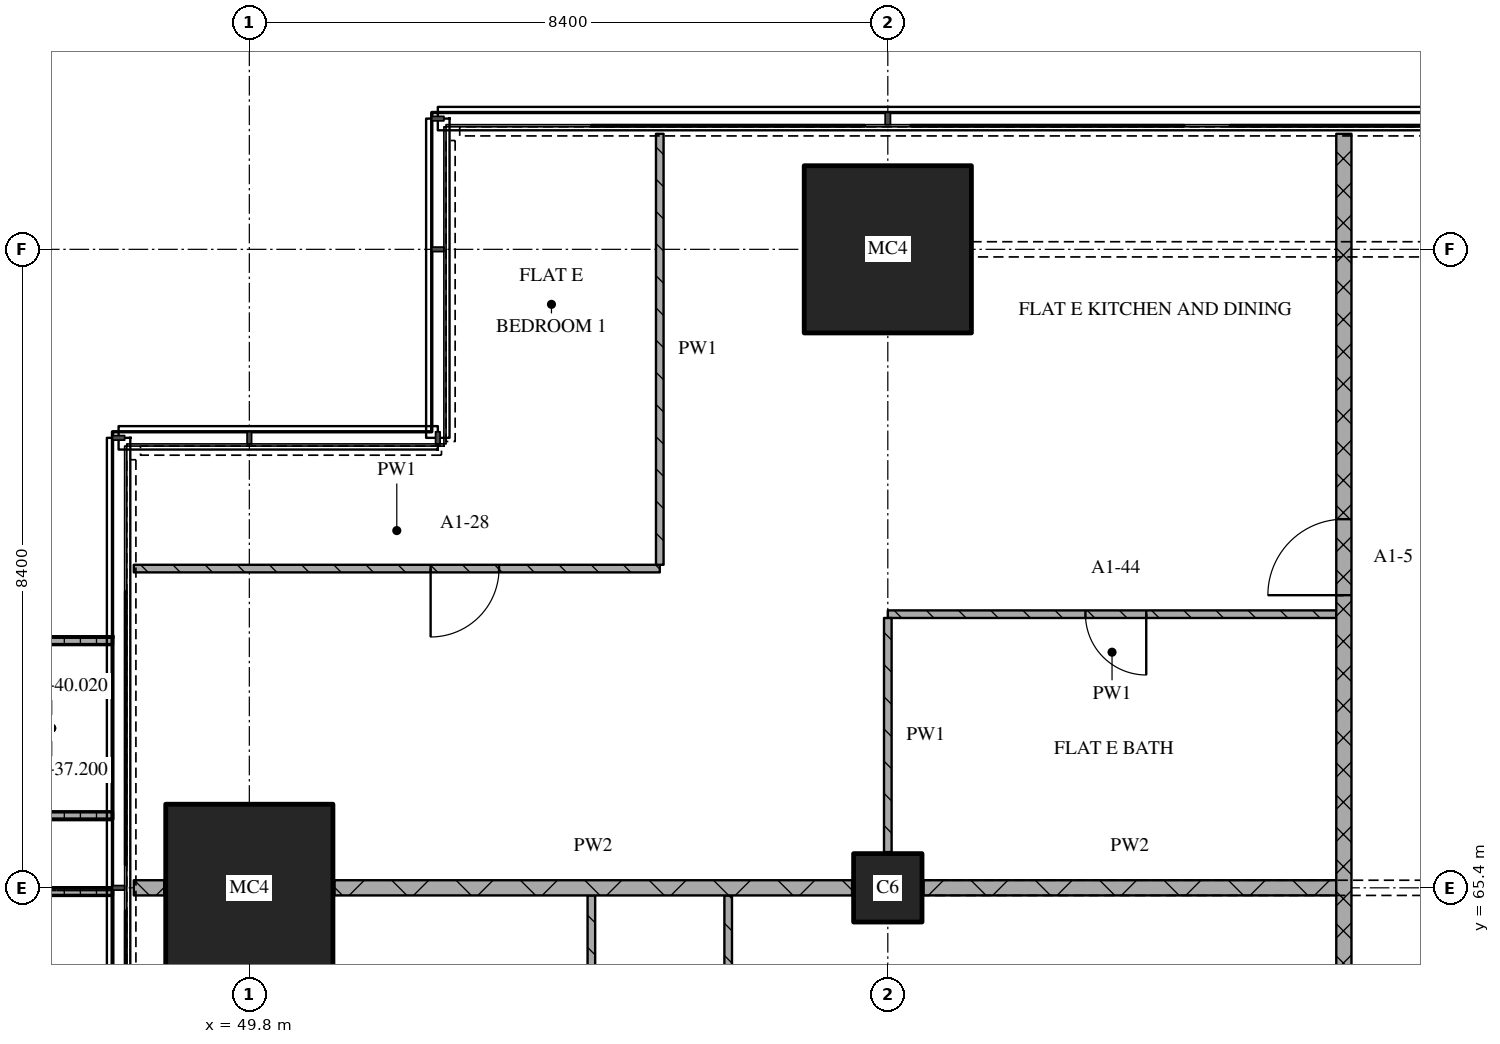
"""IFC4 building model, lengths in metres.
Left out: names, types, materials, properties, quantities, classifications, styles, units other than length and angle.
Written with IfcOpenShell. Run it as: python <this file> out.ifc"""

import sys

from ifc_helpers import new_model, si_unit, direction, frame, frame_2d, origin, origin_2d, place, context, subcontext, project, spatial, polyline, rectangle, outline, extrude, element, fill, save


model = new_model("IFC4")
c1 = context("Model", 3, precision=1e-05, world=origin(), true_north=direction((0.0, 1.0)))
c2 = subcontext(c1, "Body", "Model", "MODEL_VIEW")
j1 = project(units=[si_unit("LENGTHUNIT", "METRE"), si_unit("PLANEANGLEUNIT", "RADIAN")], contexts=[c1])
p1 = place(None, origin())
s1 = spatial("IfcSite", under=j1, at=p1, CompositionType="ELEMENT")
p2 = place(p1, origin())
s2 = spatial("IfcBuilding", under=s1, at=p2, CompositionType="ELEMENT")
p3 = place(p2, frame((0.0, 0.0, 37.2)))
s3 = spatial("IfcBuildingStorey", under=s2, at=p3, CompositionType="ELEMENT", Elevation=37.2)
p4 = place(p3, frame((49.8, 65.4, 0.0), z_axis=(0.0, 0.0, 1.0), x_axis=(1.0, 0.0, 0.0)))
e1 = element("IfcColumn", 1, at=p4, inside=s3, PredefinedType="COLUMN", context=c2, shape_type="SweptSolid", body=[
    extrude(rectangle(XDim=2.2, YDim=2.2, at=origin_2d()), origin(), (0.0, 0.0, 1.0), 3.6),
])
p5 = place(p3, frame((58.2, 65.4, 0.0), z_axis=(0.0, 0.0, 1.0), x_axis=(1.0, 0.0, 0.0)))
e2 = element("IfcColumn", 2, at=p5, inside=s3, PredefinedType="COLUMN", context=c2, shape_type="SweptSolid", body=[
    extrude(rectangle(XDim=0.9, YDim=0.9, at=origin_2d()), origin(), (0.0, 0.0, 1.0), 3.6),
])
p6 = place(p3, frame((58.2, 73.8, 0.0), z_axis=(0.0, 0.0, 1.0), x_axis=(1.0, 0.0, 0.0)))
e3 = element("IfcColumn", 3, at=p6, inside=s3, PredefinedType="COLUMN", context=c2, shape_type="SweptSolid", body=[
    extrude(rectangle(XDim=2.2, YDim=2.2, at=origin_2d()), origin(), (0.0, 0.0, 1.0), 3.6),
])
p7 = place(p3, origin())
e4 = element("IfcWall", 4, at=p7, inside=s3, PredefinedType="SOLIDWALL", context=c2, shape_type="SweptSolid", body=[
    extrude(outline(polyline([(48.0, 68.7), (48.0, 68.6), (46.5, 68.6), (46.5, 66.4), (48.0, 66.4), (48.0, 66.3), (46.4, 66.3), (46.4, 68.7), (48.0, 68.7)])), origin(), (0.0, 0.0, 1.0), 1.0),
])
p8 = place(p3, origin())
e5 = element("IfcWall", 5, at=p8, inside=s3, PredefinedType="SOLIDWALL", context=c2, shape_type="SweptSolid", body=[
    extrude(outline(polyline([(48.0, 65.4), (48.0, 65.3), (46.367, 65.3), (46.367, 61.3), (48.0, 61.3), (48.0, 61.2), (46.267, 61.2), (46.267, 65.4), (48.0, 65.4)])), origin(), (0.0, 0.0, 1.0), 1.0),
])
p9 = place(p3, frame((48.28, 65.4, 0.0), z_axis=(0.0, 0.0, 1.0), x_axis=(1.0, 0.0, 0.0)))
e6 = element("IfcWall", 6, at=p9, inside=s3, PredefinedType="PARTITIONING", context=c2, shape_type="SweptSolid", body=[
    extrude(rectangle(XDim=0.4, YDim=0.2, at=frame_2d((0.2, 0.0))), origin(), (0.0, 0.0, 1.0), 3.32),
])
p10 = place(p3, frame((50.92, 65.4, 0.0), z_axis=(0.0, 0.0, 1.0), x_axis=(1.0, 0.0, 0.0)))
e7 = element("IfcWall", 7, at=p10, inside=s3, PredefinedType="PARTITIONING", context=c2, shape_type="SweptSolid", body=[
    extrude(rectangle(XDim=6.81, YDim=0.2, at=frame_2d((3.405, 0.0))), origin(), (0.0, 0.0, 1.0), 3.32),
])
p11 = place(p3, frame((58.67, 65.4, 0.0), z_axis=(0.0, 0.0, 1.0), x_axis=(1.0, 0.0, 0.0)))
e8 = element("IfcWall", 8, at=p11, inside=s3, PredefinedType="PARTITIONING", context=c2, shape_type="SweptSolid", body=[
    extrude(rectangle(XDim=5.43, YDim=0.2, at=frame_2d((2.715, 0.0))), origin(), (0.0, 0.0, 1.0), 2.82),
])
p12 = place(p3, frame((64.1, 69.0, 0.0), z_axis=(0.0, 0.0, 1.0), x_axis=(-1.0, 0.0, 0.0)))
e9 = element("IfcWall", 9, at=p12, inside=s3, PredefinedType="PARTITIONING", context=c2, shape_type="SweptSolid", body=[
    extrude(rectangle(XDim=5.9, YDim=0.1, at=frame_2d((2.95, 0.0))), origin(), (0.0, 0.0, 1.0), 3.32),
])
p13 = place(p12, frame((2.5, 0.0, 0.0)))
e10 = element("IfcOpeningElement", 10, at=p13, cuts=e9, PredefinedType="OPENING", context=c2, shape_type="SweptSolid", body=[
    extrude(rectangle(XDim=0.8, YDim=2.1, at=frame_2d((0.4, 1.05))), frame((0.0, 0.06, 0.0), z_axis=(0.0, -1.0, 0.0), x_axis=(1.0, 0.0, 0.0)), (0.0, 0.0, 1.0), 0.12),
])
p14 = place(p3, frame((48.28, 69.6, 0.0), z_axis=(0.0, 0.0, 1.0), x_axis=(1.0, 0.0, 0.0)))
e11 = element("IfcWall", 11, at=p14, inside=s3, PredefinedType="PARTITIONING", context=c2, shape_type="SweptSolid", body=[
    extrude(rectangle(XDim=6.92, YDim=0.1, at=frame_2d((3.46, 0.0))), origin(), (0.0, 0.0, 1.0), 3.32),
])
p15 = place(p14, frame((3.905, 0.0, 0.0)))
e12 = element("IfcOpeningElement", 12, at=p15, cuts=e11, PredefinedType="OPENING", context=c2, shape_type="SweptSolid", body=[
    extrude(rectangle(XDim=0.9, YDim=2.1, at=frame_2d((0.45, 1.05))), frame((0.0, 0.06, 0.0), z_axis=(0.0, -1.0, 0.0), x_axis=(1.0, 0.0, 0.0)), (0.0, 0.0, 1.0), 0.12),
])
p16 = place(p3, frame((54.3, 52.85, 0.0), z_axis=(0.0, 0.0, 1.0), x_axis=(0.0, 1.0, 0.0)))
e13 = element("IfcWall", 13, at=p16, inside=s3, PredefinedType="PARTITIONING", context=c2, shape_type="SweptSolid", body=[
    extrude(rectangle(XDim=12.45, YDim=0.1, at=frame_2d((6.225, 0.0))), origin(), (0.0, 0.0, 1.0), 3.32),
])
p17 = place(p16, frame((10.0, 0.0, 0.0)))
e14 = element("IfcOpeningElement", 14, at=p17, cuts=e13, PredefinedType="OPENING", context=c2, shape_type="SweptSolid", body=[
    extrude(rectangle(XDim=0.9, YDim=2.1, at=frame_2d((0.45, 1.05))), frame((0.0, 0.06, 0.0), z_axis=(0.0, -1.0, 0.0), x_axis=(1.0, 0.0, 0.0)), (0.0, 0.0, 1.0), 0.12),
])
p18 = place(p3, frame((55.2, 75.32, 0.0), z_axis=(0.0, 0.0, 1.0), x_axis=(0.0, -1.0, 0.0)))
e15 = element("IfcWall", 15, at=p18, inside=s3, PredefinedType="PARTITIONING", context=c2, shape_type="SweptSolid", body=[
    extrude(rectangle(XDim=5.67, YDim=0.1, at=frame_2d((2.835, 0.0))), origin(), (0.0, 0.0, 1.0), 3.32),
])
p19 = place(p3, frame((56.1, 65.3, 0.0), z_axis=(0.0, 0.0, 1.0), x_axis=(0.0, -1.0, 0.0)))
e16 = element("IfcWall", 16, at=p19, inside=s3, PredefinedType="PARTITIONING", context=c2, shape_type="SweptSolid", body=[
    extrude(rectangle(XDim=7.088, YDim=0.1, at=frame_2d((3.544, 0.0))), origin(), (0.0, 0.0, 1.0), 3.32),
])
p20 = place(p19, frame((3.069, 0.0, 0.0)))
e17 = element("IfcOpeningElement", 17, at=p20, cuts=e16, PredefinedType="OPENING", context=c2, shape_type="SweptSolid", body=[
    extrude(rectangle(XDim=0.9, YDim=2.1, at=frame_2d((0.45, 1.05))), frame((0.0, 0.06, 0.0), z_axis=(0.0, -1.0, 0.0), x_axis=(1.0, 0.0, 0.0)), (0.0, 0.0, 1.0), 0.12),
])
p21 = place(p3, frame((58.2, 68.95, 0.0), z_axis=(0.0, 0.0, 1.0), x_axis=(0.0, -1.0, 0.0)))
e18 = element("IfcWall", 18, at=p21, inside=s3, PredefinedType="PARTITIONING", context=c2, shape_type="SweptSolid", body=[
    extrude(rectangle(XDim=3.08, YDim=0.1, at=frame_2d((1.54, 0.0))), origin(), (0.0, 0.0, 1.0), 3.32),
])
p22 = place(p3, frame((64.2, 43.3, 0.0), z_axis=(0.0, 0.0, 1.0), x_axis=(0.0, 1.0, 0.0)))
e19 = element("IfcWall", 19, at=p22, inside=s3, PredefinedType="PARTITIONING", context=c2, shape_type="SweptSolid", body=[
    extrude(rectangle(XDim=32.02, YDim=0.2, at=frame_2d((16.01, 0.0))), origin(), (0.0, 0.0, 1.0), 3.32),
])
p23 = place(p22, frame((8.55, 0.0, 0.0)))
e20 = element("IfcOpeningElement", 20, at=p23, cuts=e19, PredefinedType="OPENING", context=c2, shape_type="SweptSolid", body=[
    extrude(rectangle(XDim=1.0, YDim=2.1, at=frame_2d((0.5, 1.05))), frame((0.0, 0.11, 0.0), z_axis=(0.0, -1.0, 0.0), x_axis=(1.0, 0.0, 0.0)), (0.0, 0.0, 1.0), 0.22),
])
p24 = place(p22, frame((25.95, 0.0, 0.0)))
e21 = element("IfcOpeningElement", 21, at=p24, cuts=e19, PredefinedType="OPENING", context=c2, shape_type="SweptSolid", body=[
    extrude(rectangle(XDim=1.0, YDim=2.1, at=frame_2d((0.5, 1.05))), frame((0.0, 0.11, 0.0), z_axis=(0.0, -1.0, 0.0), x_axis=(1.0, 0.0, 0.0)), (0.0, 0.0, 1.0), 0.22),
])
p25 = place(p13, origin())
e22 = element("IfcDoor", 22, at=p25, inside=s3, OperationType="SINGLE_SWING_LEFT", PredefinedType="DOOR", context=c2, shape_type="SweptSolid", body=[
    extrude(rectangle(XDim=0.8, YDim=2.1, at=frame_2d((0.4, 1.05))), frame((0.0, 0.025, 0.0), z_axis=(0.0, -1.0, 0.0), x_axis=(1.0, 0.0, 0.0)), (0.0, 0.0, 1.0), 0.05),
])
fill(e10, e22)
p26 = place(p15, origin())
e23 = element("IfcDoor", 23, at=p26, inside=s3, OperationType="SINGLE_SWING_RIGHT", PredefinedType="DOOR", context=c2, shape_type="SweptSolid", body=[
    extrude(rectangle(XDim=0.9, YDim=2.1, at=frame_2d((0.45, 1.05))), frame((0.0, 0.025, 0.0), z_axis=(0.0, -1.0, 0.0), x_axis=(1.0, 0.0, 0.0)), (0.0, 0.0, 1.0), 0.05),
])
fill(e12, e23)
p27 = place(p24, origin())
e24 = element("IfcDoor", 24, at=p27, inside=s3, OperationType="SINGLE_SWING_LEFT", PredefinedType="DOOR", context=c2, shape_type="SweptSolid", body=[
    extrude(rectangle(XDim=1.0, YDim=2.1, at=frame_2d((0.5, 1.05))), frame((0.0, 0.025, 0.0), z_axis=(0.0, -1.0, 0.0), x_axis=(1.0, 0.0, 0.0)), (0.0, 0.0, 1.0), 0.05),
])
fill(e21, e24)
save(model, sys.argv[1])
